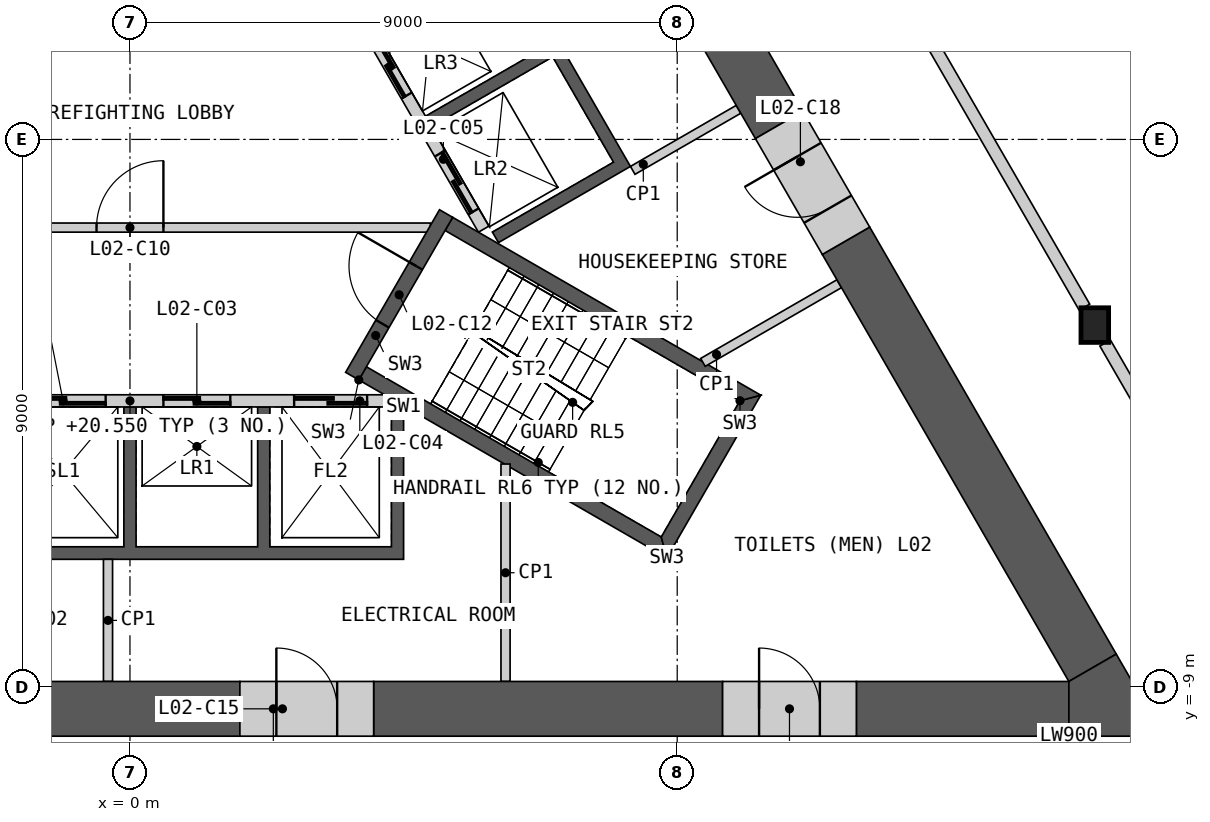
"""IFC4 building model, lengths in metres.
Left out: names, types, materials, properties, quantities, classifications, styles, units other than length and angle.
Written with IfcOpenShell. Run it as: python <this file> out.ifc"""

import sys

from ifc_helpers import new_model, si_unit, direction, frame, frame_2d, origin, origin_2d, place, context, subcontext, project, spatial, polyline, rectangle, i_section, outline, extrude, element, fill, save


model = new_model("IFC4")
c1 = context("Model", 3, precision=1e-05, world=origin(), true_north=direction((0.0, 1.0)))
c2 = subcontext(c1, "Body", "Model", "MODEL_VIEW")
j1 = project(units=[si_unit("LENGTHUNIT", "METRE"), si_unit("PLANEANGLEUNIT", "RADIAN")], contexts=[c1])
p1 = place(None, origin())
s1 = spatial("IfcSite", under=j1, at=p1, CompositionType="ELEMENT")
p2 = place(p1, origin())
s2 = spatial("IfcBuilding", under=s1, at=p2, CompositionType="ELEMENT")
p3 = place(p2, frame((0.0, 0.0, 15.5)))
s3 = spatial("IfcBuildingStorey", under=s2, at=p3, CompositionType="ELEMENT", Elevation=15.5)
p4 = place(p3, frame((15.868, -3.054, 0.0), z_axis=(0.0, 0.0, 1.0), x_axis=(1.0, 0.0, 0.0)))
e1 = element("IfcColumn", 1, at=p4, inside=s3, PredefinedType="COLUMN", context=c2, shape_type="SweptSolid", body=[
    extrude(i_section(OverallWidth=0.454, OverallDepth=0.57, WebThickness=0.078, FlangeThickness=0.125, at=origin_2d()), origin(), (0.0, 0.0, 1.0), 5.5),
])
p5 = place(p3, origin())
e2 = element("IfcWall", 2, at=p5, inside=s3, PredefinedType="SHEAR", context=c2, shape_type="SweptSolid", body=[
    extrude(outline(polyline([(4.5, -4.4), (4.5, -6.906), (-4.5, -6.906), (-4.5, -4.4), (-4.3, -4.4), (-4.3, -6.7), (-2.3, -6.7), (-2.3, -4.4), (-2.1, -4.4), (-2.1, -6.7), (-0.1, -6.7), (-0.1, -4.4), (0.1, -4.4), (0.1, -6.7), (2.1, -6.7), (2.1, -4.4), (2.3, -4.4), (2.3, -6.7), (4.3, -6.7), (4.3, -4.4), (4.5, -4.4)])), origin(), (0.0, 0.0, 1.0), 5.05),
])
p6 = place(p3, frame((-4.187, -4.3, 0.0), z_axis=(0.0, 0.0, 1.0), x_axis=(1.0, 0.0, 0.0)))
e3 = element("IfcWall", 3, at=p6, inside=s3, PredefinedType="SOLIDWALL", context=c2, shape_type="SweptSolid", body=[
    extrude(rectangle(XDim=8.373, YDim=0.2, at=frame_2d((4.187, 0.0))), origin(), (0.0, 0.0, 1.0), 5.05),
])
p7 = place(p6, frame((0.287, 0.0, 0.0)))
e4 = element("IfcOpeningElement", 4, at=p7, cuts=e3, PredefinedType="OPENING", context=c2, shape_type="SweptSolid", body=[
    extrude(rectangle(XDim=1.2, YDim=2.1, at=frame_2d((0.6, 1.05))), frame((0.0, 0.11, 0.0), z_axis=(0.0, -1.0, 0.0), x_axis=(1.0, 0.0, 0.0)), (0.0, 0.0, 1.0), 0.22),
])
p8 = place(p6, frame((2.387, 0.0, 0.0)))
e5 = element("IfcOpeningElement", 5, at=p8, cuts=e3, PredefinedType="OPENING", context=c2, shape_type="SweptSolid", body=[
    extrude(rectangle(XDim=1.4, YDim=2.1, at=frame_2d((0.7, 1.05))), frame((0.0, 0.11, 0.0), z_axis=(0.0, -1.0, 0.0), x_axis=(1.0, 0.0, 0.0)), (0.0, 0.0, 1.0), 0.22),
])
p9 = place(p6, frame((4.737, 0.0, 0.0)))
e6 = element("IfcOpeningElement", 6, at=p9, cuts=e3, PredefinedType="OPENING", context=c2, shape_type="SweptSolid", body=[
    extrude(rectangle(XDim=1.1, YDim=2.1, at=frame_2d((0.55, 1.05))), frame((0.0, 0.11, 0.0), z_axis=(0.0, -1.0, 0.0), x_axis=(1.0, 0.0, 0.0)), (0.0, 0.0, 1.0), 0.22),
])
p10 = place(p6, frame((6.887, 0.0, 0.0)))
e7 = element("IfcOpeningElement", 7, at=p10, cuts=e3, PredefinedType="OPENING", context=c2, shape_type="SweptSolid", body=[
    extrude(rectangle(XDim=1.2, YDim=2.1, at=frame_2d((0.6, 1.05))), frame((0.0, 0.11, 0.0), z_axis=(0.0, -1.0, 0.0), x_axis=(1.0, 0.0, 0.0)), (0.0, 0.0, 1.0), 0.22),
])
p11 = place(p3, origin())
e8 = element("IfcWall", 8, at=p11, inside=s3, PredefinedType="SHEAR", context=c2, shape_type="SweptSolid", body=[
    extrude(outline(polyline([(2.66, 4.192), (4.831, 5.445), (8.231, -0.444), (6.061, -1.697), (5.96, -1.524), (7.952, -0.374), (6.952, 1.358), (4.96, 0.208), (4.861, 0.381), (6.852, 1.531), (5.852, 3.263), (3.861, 2.113), (3.76, 2.287), (5.752, 3.437), (4.752, 5.169), (2.76, 4.019), (2.66, 4.192)])), origin(), (0.0, 0.0, 1.0), 5.05),
])
p12 = place(p3, frame((5.817, -1.476, 0.0), z_axis=(0.0, 0.0, 1.0), x_axis=(-0.500002616675, 0.866023893041, 0.0)))
e9 = element("IfcWall", 9, at=p12, inside=s3, PredefinedType="SOLIDWALL", context=c2, shape_type="SweptSolid", body=[
    extrude(rectangle(XDim=8.373, YDim=0.2, at=frame_2d((4.187, 0.0))), origin(), (0.0, 0.0, 1.0), 5.05),
])
p13 = place(p12, frame((0.337, 0.0, 0.0)))
e10 = element("IfcOpeningElement", 10, at=p13, cuts=e9, PredefinedType="OPENING", context=c2, shape_type="SweptSolid", body=[
    extrude(rectangle(XDim=1.1, YDim=2.1, at=frame_2d((0.55, 1.05))), frame((0.0, 0.11, 0.0), z_axis=(0.0, -1.0, 0.0), x_axis=(1.0, 0.0, 0.0)), (0.0, 0.0, 1.0), 0.22),
])
p14 = place(p12, frame((2.537, 0.0, 0.0)))
e11 = element("IfcOpeningElement", 11, at=p14, cuts=e9, PredefinedType="OPENING", context=c2, shape_type="SweptSolid", body=[
    extrude(rectangle(XDim=1.1, YDim=2.1, at=frame_2d((0.55, 1.05))), frame((0.0, 0.11, 0.0), z_axis=(0.0, -1.0, 0.0), x_axis=(1.0, 0.0, 0.0)), (0.0, 0.0, 1.0), 0.22),
])
p15 = place(p12, frame((4.737, 0.0, 0.0)))
e12 = element("IfcOpeningElement", 12, at=p15, cuts=e9, PredefinedType="OPENING", context=c2, shape_type="SweptSolid", body=[
    extrude(rectangle(XDim=1.1, YDim=2.1, at=frame_2d((0.55, 1.05))), frame((0.0, 0.11, 0.0), z_axis=(0.0, -1.0, 0.0), x_axis=(1.0, 0.0, 0.0)), (0.0, 0.0, 1.0), 0.22),
])
p16 = place(p12, frame((7.037, 0.0, 0.0)))
e13 = element("IfcOpeningElement", 13, at=p16, cuts=e9, PredefinedType="OPENING", context=c2, shape_type="SweptSolid", body=[
    extrude(rectangle(XDim=0.9, YDim=2.1, at=frame_2d((0.45, 1.05))), frame((0.0, 0.11, 0.0), z_axis=(0.0, -1.0, 0.0), x_axis=(1.0, 0.0, 0.0)), (0.0, 0.0, 1.0), 0.22),
])
p17 = place(p3, frame((-4.941, -1.45, 0.0), z_axis=(0.0, 0.0, 1.0), x_axis=(1.0, 0.0, 0.0)))
e14 = element("IfcWall", 14, at=p17, inside=s3, PredefinedType="PARTITIONING", context=c2, shape_type="SweptSolid", body=[
    extrude(rectangle(XDim=9.882, YDim=0.15, at=frame_2d((4.941, 0.0))), origin(), (0.0, 0.0, 1.0), 5.05),
])
p18 = place(p17, frame((4.391, 0.0, 0.0)))
e15 = element("IfcOpeningElement", 15, at=p18, cuts=e14, PredefinedType="OPENING", context=c2, shape_type="SweptSolid", body=[
    extrude(rectangle(XDim=1.1, YDim=2.1, at=frame_2d((0.55, 1.05))), frame((0.0, 0.085, 0.0), z_axis=(0.0, -1.0, 0.0), x_axis=(1.0, 0.0, 0.0)), (0.0, 0.0, 1.0), 0.17),
])
p19 = place(p3, origin())
e16 = element("IfcWall", 16, at=p19, inside=s3, PredefinedType="SHEAR", context=c2, shape_type="SweptSolid", body=[
    extrude(outline(polyline([(3.763, -3.956), (8.83, -6.881), (8.738, -6.539), (3.888, -3.739), (3.763, -3.956)])), origin(), (0.0, 0.0, 1.0), 5.05),
])
p20 = place(p3, origin())
e17 = element("IfcWall", 17, at=p20, inside=s3, PredefinedType="SHEAR", context=c2, shape_type="SweptSolid", body=[
    extrude(outline(polyline([(8.83, -6.881), (10.374, -4.206), (10.032, -4.298), (8.738, -6.539), (8.83, -6.881)])), origin(), (0.0, 0.0, 1.0), 5.05),
])
p21 = place(p3, origin())
e18 = element("IfcWall", 18, at=p21, inside=s3, PredefinedType="SHEAR", context=c2, shape_type="SweptSolid", body=[
    extrude(outline(polyline([(10.032, -4.298), (10.374, -4.206), (5.307, -1.281), (5.182, -1.498), (10.032, -4.298)])), origin(), (0.0, 0.0, 1.0), 5.05),
])
p22 = place(p3, frame((3.655, -3.893, 0.0), z_axis=(0.0, 0.0, 1.0), x_axis=(0.499982516597, 0.866035497597, 0.0)))
e19 = element("IfcWall", 19, at=p22, inside=s3, PredefinedType="SHEAR", context=c2, shape_type="SweptSolid", body=[
    extrude(rectangle(XDim=3.088, YDim=0.25, at=frame_2d((1.544, 0.0))), origin(), (0.0, 0.0, 1.0), 5.05),
])
p23 = place(p22, frame((0.994, 0.0, 0.0)))
e20 = element("IfcOpeningElement", 20, at=p23, cuts=e19, PredefinedType="OPENING", context=c2, shape_type="SweptSolid", body=[
    extrude(rectangle(XDim=1.1, YDim=2.1, at=frame_2d((0.55, 1.05))), frame((0.0, 0.135, 0.0), z_axis=(0.0, -1.0, 0.0), x_axis=(1.0, 0.0, 0.0)), (0.0, 0.0, 1.0), 0.27),
])
p24 = place(p3, frame((8.268, -0.509, 0.0), z_axis=(0.0, 0.0, 1.0), x_axis=(0.866035824272, 0.499981950752, 0.0)))
e21 = element("IfcWall", 21, at=p24, inside=s3, PredefinedType="PARTITIONING", context=c2, shape_type="SweptSolid", body=[
    extrude(rectangle(XDim=2.009, YDim=0.15, at=frame_2d((1.004, 0.0))), origin(), (0.0, 0.0, 1.0), 5.05),
])
p25 = place(p3, frame((6.177, -8.915, 0.0), z_axis=(0.0, 0.0, 1.0), x_axis=(0.0, 1.0, 0.0)))
e22 = element("IfcWall", 22, at=p25, inside=s3, PredefinedType="PARTITIONING", context=c2, shape_type="SweptSolid", body=[
    extrude(rectangle(XDim=3.576, YDim=0.15, at=frame_2d((1.788, 0.0))), origin(), (0.0, 0.0, 1.0), 5.05),
])
p26 = place(p3, frame((-0.361, -8.915, 0.0), z_axis=(0.0, 0.0, 1.0), x_axis=(0.0, 1.0, 0.0)))
e23 = element("IfcWall", 23, at=p26, inside=s3, PredefinedType="PARTITIONING", context=c2, shape_type="SweptSolid", body=[
    extrude(rectangle(XDim=2.009, YDim=0.15, at=frame_2d((1.004, 0.0))), origin(), (0.0, 0.0, 1.0), 5.05),
])
p27 = place(p3, frame((11.664, -2.373, 0.0), z_axis=(0.0, 0.0, 1.0), x_axis=(-0.866034804124, -0.499983717781, 0.0)))
e24 = element("IfcWall", 24, at=p27, inside=s3, PredefinedType="PARTITIONING", context=c2, shape_type="SweptSolid", body=[
    extrude(rectangle(XDim=2.588, YDim=0.15, at=frame_2d((1.294, 0.0))), origin(), (0.0, 0.0, 1.0), 5.05),
])
p28 = place(p3, frame((4.008, -9.365, 0.0), z_axis=(0.0, 0.0, 1.0), x_axis=(1.0, 0.0, 0.0)))
e25 = element("IfcWall", 25, at=p28, inside=s3, PredefinedType="SHEAR", context=c2, shape_type="SweptSolid", body=[
    extrude(rectangle(XDim=5.739, YDim=0.9, at=frame_2d((2.869, 0.0))), origin(), (0.0, 0.0, 1.0), 5.05),
])
p29 = place(p3, frame((11.946, -9.365, 0.0), z_axis=(0.0, 0.0, 1.0), x_axis=(1.0, 0.0, 0.0)))
e26 = element("IfcWall", 26, at=p29, inside=s3, PredefinedType="SHEAR", context=c2, shape_type="SweptSolid", body=[
    extrude(rectangle(XDim=3.495, YDim=0.9, at=frame_2d((1.748, 0.0))), origin(), (0.0, 0.0, 1.0), 5.05),
])
p30 = place(p3, frame((-1.55, -9.365, 0.0), z_axis=(0.0, 0.0, 1.0), x_axis=(1.0, 0.0, 0.0)))
e27 = element("IfcWall", 27, at=p30, inside=s3, PredefinedType="SHEAR", context=c2, shape_type="SweptSolid", body=[
    extrude(rectangle(XDim=3.357, YDim=0.9, at=frame_2d((1.679, 0.0))), origin(), (0.0, 0.0, 1.0), 5.05),
])
p31 = place(p3, frame((15.831, -8.69, 0.0), z_axis=(0.0, 0.0, 1.0), x_axis=(-0.499995201193, 0.866028174359, 0.0)))
e28 = element("IfcWall", 28, at=p31, inside=s3, PredefinedType="SHEAR", context=c2, shape_type="SweptSolid", body=[
    extrude(rectangle(XDim=8.11, YDim=0.9, at=frame_2d((4.055, 0.0))), origin(), (0.0, 0.0, 1.0), 5.05),
])
p32 = place(p3, frame((10.676, 0.239, 0.0), z_axis=(0.0, 0.0, 1.0), x_axis=(-0.499978737809, 0.866037679168, 0.0)))
e29 = element("IfcWall", 29, at=p32, inside=s3, PredefinedType="SHEAR", context=c2, shape_type="SweptSolid", body=[
    extrude(rectangle(XDim=2.831, YDim=0.9, at=frame_2d((1.416, 0.0))), origin(), (0.0, 0.0, 1.0), 5.05),
])
p33 = place(p3, origin())
e30 = element("IfcWall", 30, at=p33, inside=s3, PredefinedType="SHEAR", context=c2, shape_type="SweptSolid", body=[
    extrude(outline(polyline([(15.441, -9.815), (15.441, -8.915), (16.221, -8.465), (17.0, -9.815), (15.441, -9.815)])), origin(), (0.0, 0.0, 1.0), 5.05),
])
p34 = place(p3, frame((1.808, -9.365, 0.0), z_axis=(0.0, 0.0, 1.0), x_axis=(1.0, 0.0, 0.0)))
e31 = element("IfcWall", 31, at=p34, inside=s3, PredefinedType="SHEAR", context=c2, shape_type="SweptSolid", body=[
    extrude(rectangle(XDim=2.2, YDim=0.9, at=frame_2d((1.1, 0.0))), origin(), (0.0, 0.0, 1.0), 5.05),
])
p35 = place(p34, frame((0.6, 0.0, 0.0)))
e32 = element("IfcOpeningElement", 32, at=p35, cuts=e31, PredefinedType="OPENING", context=c2, shape_type="SweptSolid", body=[
    extrude(rectangle(XDim=1.0, YDim=2.1, at=frame_2d((0.5, 1.05))), frame((0.0, 0.46, 0.0), z_axis=(0.0, -1.0, 0.0), x_axis=(1.0, 0.0, 0.0)), (0.0, 0.0, 1.0), 0.92),
])
p36 = place(p3, frame((9.746, -9.365, 0.0), z_axis=(0.0, 0.0, 1.0), x_axis=(1.0, 0.0, 0.0)))
e33 = element("IfcWall", 33, at=p36, inside=s3, PredefinedType="SHEAR", context=c2, shape_type="SweptSolid", body=[
    extrude(rectangle(XDim=2.2, YDim=0.9, at=frame_2d((1.1, 0.0))), origin(), (0.0, 0.0, 1.0), 5.05),
])
p37 = place(p36, frame((0.6, 0.0, 0.0)))
e34 = element("IfcOpeningElement", 34, at=p37, cuts=e33, PredefinedType="OPENING", context=c2, shape_type="SweptSolid", body=[
    extrude(rectangle(XDim=1.0, YDim=2.1, at=frame_2d((0.5, 1.05))), frame((0.0, 0.46, 0.0), z_axis=(0.0, -1.0, 0.0), x_axis=(1.0, 0.0, 0.0)), (0.0, 0.0, 1.0), 0.92),
])
p38 = place(p3, frame((11.776, -1.667, 0.0), z_axis=(0.0, 0.0, 1.0), x_axis=(-0.50002983664, 0.866008176907, 0.0)))
e35 = element("IfcWall", 35, at=p38, inside=s3, PredefinedType="SHEAR", context=c2, shape_type="SweptSolid", body=[
    extrude(rectangle(XDim=2.2, YDim=0.9, at=frame_2d((1.1, 0.0))), origin(), (0.0, 0.0, 1.0), 5.05),
])
p39 = place(p38, frame((0.6, 0.0, 0.0)))
e36 = element("IfcOpeningElement", 36, at=p39, cuts=e35, PredefinedType="OPENING", context=c2, shape_type="SweptSolid", body=[
    extrude(rectangle(XDim=1.0, YDim=2.1, at=frame_2d((0.5, 1.05))), frame((0.0, 0.46, 0.0), z_axis=(0.0, -1.0, 0.0), x_axis=(1.0, 0.0, 0.0)), (0.0, 0.0, 1.0), 0.92),
])
p40 = place(p3, frame((10.749, 5.813, 0.0), z_axis=(0.0, 0.0, 1.0), x_axis=(0.500004292778, -0.866022925334, 0.0)))
e37 = element("IfcWall", 37, at=p40, inside=s3, PredefinedType="PARTITIONING", context=c2, shape_type="SweptSolid", body=[
    extrude(rectangle(XDim=9.898, YDim=0.2, at=frame_2d((4.949, 0.0))), origin(), (0.0, 0.0, 1.0), 5.05),
])
p41 = place(p3, frame((16.038, -3.348, 0.0), z_axis=(0.0, 0.0, 1.0), x_axis=(0.499988314375, -0.866032150378, 0.0)))
e38 = element("IfcWall", 38, at=p41, inside=s3, PredefinedType="PARTITIONING", context=c2, shape_type="SweptSolid", body=[
    extrude(rectangle(XDim=6.412, YDim=0.2, at=frame_2d((3.206, 0.0))), origin(), (0.0, 0.0, 1.0), 5.05),
])
p42 = place(p41, frame((2.256, 0.0, 0.0)))
e39 = element("IfcOpeningElement", 39, at=p42, cuts=e38, PredefinedType="OPENING", context=c2, shape_type="SweptSolid", body=[
    extrude(rectangle(XDim=1.8, YDim=2.1, at=frame_2d((0.9, 1.05))), frame((0.0, 0.11, 0.0), z_axis=(0.0, -1.0, 0.0), x_axis=(1.0, 0.0, 0.0)), (0.0, 0.0, 1.0), 0.22),
])
p43 = place(p8, origin())
e40 = element("IfcDoor", 40, at=p43, inside=s3, OperationType="SLIDING_TO_LEFT", PredefinedType="DOOR", context=c2, shape_type="SweptSolid", body=[
    extrude(rectangle(XDim=1.4, YDim=2.1, at=frame_2d((0.7, 1.05))), frame((0.0, 0.025, 0.0), z_axis=(0.0, -1.0, 0.0), x_axis=(1.0, 0.0, 0.0)), (0.0, 0.0, 1.0), 0.05),
])
fill(e5, e40)
p44 = place(p9, origin())
e41 = element("IfcDoor", 41, at=p44, inside=s3, OperationType="SLIDING_TO_LEFT", PredefinedType="DOOR", context=c2, shape_type="SweptSolid", body=[
    extrude(rectangle(XDim=1.1, YDim=2.1, at=frame_2d((0.55, 1.05))), frame((0.0, 0.025, 0.0), z_axis=(0.0, -1.0, 0.0), x_axis=(1.0, 0.0, 0.0)), (0.0, 0.0, 1.0), 0.05),
])
fill(e6, e41)
p45 = place(p10, origin())
e42 = element("IfcDoor", 42, at=p45, inside=s3, OperationType="SLIDING_TO_LEFT", PredefinedType="DOOR", context=c2, shape_type="SweptSolid", body=[
    extrude(rectangle(XDim=1.2, YDim=2.1, at=frame_2d((0.6, 1.05))), frame((0.0, 0.025, 0.0), z_axis=(0.0, -1.0, 0.0), x_axis=(1.0, 0.0, 0.0)), (0.0, 0.0, 1.0), 0.05),
])
fill(e7, e42)
p46 = place(p13, origin())
e43 = element("IfcDoor", 43, at=p46, inside=s3, OperationType="SLIDING_TO_LEFT", PredefinedType="DOOR", context=c2, shape_type="SweptSolid", body=[
    extrude(rectangle(XDim=1.1, YDim=2.1, at=frame_2d((0.55, 1.05))), frame((0.0, 0.025, 0.0), z_axis=(0.0, -1.0, 0.0), x_axis=(1.0, 0.0, 0.0)), (0.0, 0.0, 1.0), 0.05),
])
fill(e10, e43)
p47 = place(p14, origin())
e44 = element("IfcDoor", 44, at=p47, inside=s3, OperationType="SLIDING_TO_LEFT", PredefinedType="DOOR", context=c2, shape_type="SweptSolid", body=[
    extrude(rectangle(XDim=1.1, YDim=2.1, at=frame_2d((0.55, 1.05))), frame((0.0, 0.025, 0.0), z_axis=(0.0, -1.0, 0.0), x_axis=(1.0, 0.0, 0.0)), (0.0, 0.0, 1.0), 0.05),
])
fill(e11, e44)
p48 = place(p18, origin())
e45 = element("IfcDoor", 45, at=p48, inside=s3, OperationType="SINGLE_SWING_RIGHT", PredefinedType="DOOR", context=c2, shape_type="SweptSolid", body=[
    extrude(rectangle(XDim=1.1, YDim=2.1, at=frame_2d((0.55, 1.05))), frame((0.0, 0.025, 0.0), z_axis=(0.0, -1.0, 0.0), x_axis=(1.0, 0.0, 0.0)), (0.0, 0.0, 1.0), 0.05),
])
fill(e15, e45)
p49 = place(p23, origin())
e46 = element("IfcDoor", 46, at=p49, inside=s3, OperationType="SINGLE_SWING_RIGHT", PredefinedType="DOOR", context=c2, shape_type="SweptSolid", body=[
    extrude(rectangle(XDim=1.1, YDim=2.1, at=frame_2d((0.55, 1.05))), frame((0.0, 0.025, 0.0), z_axis=(0.0, -1.0, 0.0), x_axis=(1.0, 0.0, 0.0)), (0.0, 0.0, 1.0), 0.05),
])
fill(e20, e46)
p50 = place(p35, origin())
e47 = element("IfcDoor", 47, at=p50, inside=s3, OperationType="SINGLE_SWING_LEFT", PredefinedType="DOOR", context=c2, shape_type="SweptSolid", body=[
    extrude(rectangle(XDim=1.0, YDim=2.1, at=frame_2d((0.5, 1.05))), frame((0.0, 0.205, 0.0), z_axis=(0.0, -1.0, 0.0), x_axis=(1.0, 0.0, 0.0)), (0.0, 0.0, 1.0), 0.05),
])
fill(e32, e47)
p51 = place(p37, origin())
e48 = element("IfcDoor", 48, at=p51, inside=s3, OperationType="SINGLE_SWING_LEFT", PredefinedType="DOOR", context=c2, shape_type="SweptSolid", body=[
    extrude(rectangle(XDim=1.0, YDim=2.1, at=frame_2d((0.5, 1.05))), frame((0.0, 0.205, 0.0), z_axis=(0.0, -1.0, 0.0), x_axis=(1.0, 0.0, 0.0)), (0.0, 0.0, 1.0), 0.05),
])
fill(e34, e48)
p52 = place(p39, origin())
e49 = element("IfcDoor", 49, at=p52, inside=s3, OperationType="SINGLE_SWING_RIGHT", PredefinedType="DOOR", context=c2, shape_type="SweptSolid", body=[
    extrude(rectangle(XDim=1.0, YDim=2.1, at=frame_2d((0.5, 1.05))), frame((0.0, 0.205, 0.0), z_axis=(0.0, -1.0, 0.0), x_axis=(1.0, 0.0, 0.0)), (0.0, 0.0, 1.0), 0.05),
])
fill(e36, e49)
save(model, sys.argv[1])
